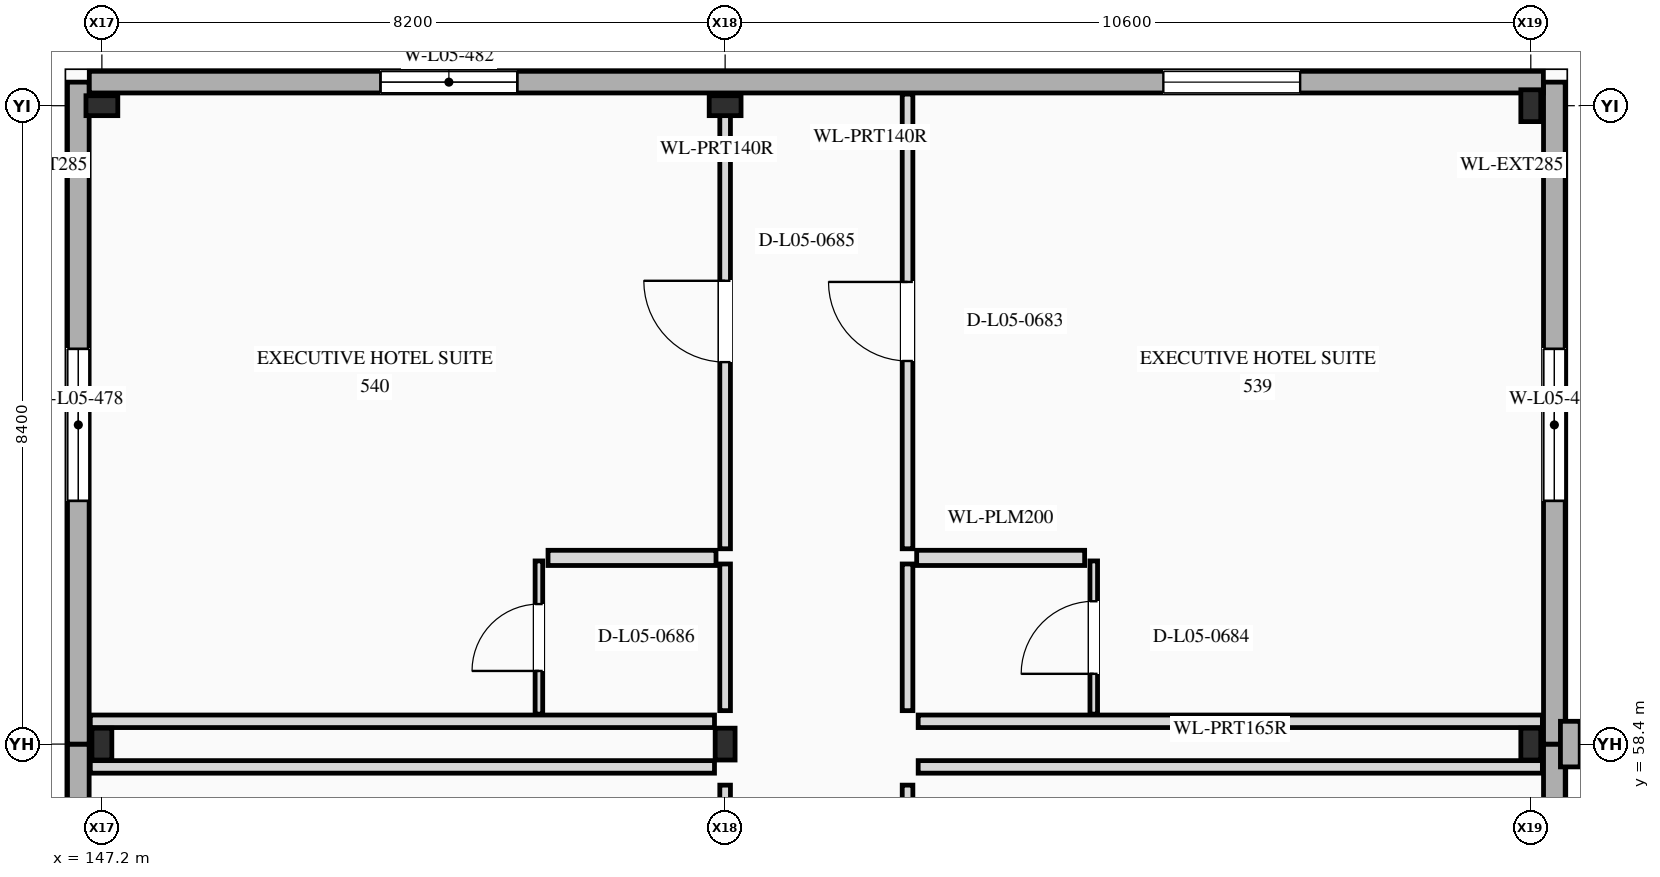
"""IFC4 building model, lengths in metres.
Left out: names, types, materials, properties, quantities, classifications, styles, units other than length and angle.
Written with IfcOpenShell. Run it as: python <this file> out.ifc"""

import sys

from ifc_helpers import new_model, si_unit, direction, frame, frame_2d, origin, origin_2d, place, context, subcontext, project, spatial, rectangle, i_section, extrude, element, fill, save


model = new_model("IFC4")
c1 = context("Model", 3, precision=1e-05, world=origin(), true_north=direction((0.0, 1.0)))
c2 = subcontext(c1, "Body", "Model", "MODEL_VIEW")
j1 = project(units=[si_unit("LENGTHUNIT", "METRE"), si_unit("PLANEANGLEUNIT", "RADIAN")], contexts=[c1])
p1 = place(None, origin())
s1 = spatial("IfcSite", under=j1, at=p1, CompositionType="ELEMENT")
p2 = place(p1, origin())
s2 = spatial("IfcBuilding", under=s1, at=p2, CompositionType="ELEMENT")
p3 = place(p2, frame((0.0, 0.0, 23.4)))
s3 = spatial("IfcBuildingStorey", under=s2, at=p3, CompositionType="ELEMENT", Elevation=23.4)
for number, where, z_axis, x_axis in (
    (1, (147.2, 58.4, 0.0), (0.0, 0.0, 1.0), (1.0, 0.0, 0.0)),
    (2, (147.2, 66.8, 0.0), (0.0, 0.0, 1.0), (0.0, 1.0, 0.0)),
    (3, (155.4, 58.4, 0.0), (0.0, 0.0, 1.0), (1.0, 0.0, 0.0)),
    (4, (155.4, 66.8, 0.0), (0.0, 0.0, 1.0), (0.0, 1.0, 0.0)),
    (5, (166.0, 58.4, 0.0), (0.0, 0.0, 1.0), (1.0, 0.0, 0.0)),
    (6, (166.0, 66.8, 0.0), (0.0, 0.0, 1.0), (1.0, 0.0, 0.0)),
):
    element("IfcColumn", number, at=place(p3, frame(where, z_axis=z_axis, x_axis=x_axis)), inside=s3, PredefinedType="COLUMN", context=c2, shape_type="SweptSolid", body=[
        extrude(i_section(OverallWidth=0.262, OverallDepth=0.419, WebThickness=0.012, FlangeThickness=0.019, at=origin_2d()), origin(), (0.0, 0.0, 1.0), 3.6),
    ])
p4 = place(p3, frame((166.31, 50.0, 0.0), z_axis=(0.0, 0.0, 1.0), x_axis=(0.0, 1.0, 0.0)))
e7 = element("IfcWall", 7, at=p4, inside=s3, PredefinedType="STANDARD", context=c2, shape_type="SweptSolid", body=[
    extrude(rectangle(XDim=8.4, YDim=0.285, at=frame_2d((4.2, 0.0))), origin(), (0.0, 0.0, 1.0), 3.6),
])
p5 = place(p4, frame((3.2, 0.0, 0.85)))
e8 = element("IfcOpeningElement", 8, at=p5, cuts=e7, PredefinedType="OPENING", context=c2, shape_type="SweptSolid", body=[
    extrude(rectangle(XDim=2.0, YDim=1.65, at=frame_2d((1.0, 0.825))), frame((0.0, 0.152, 0.0), z_axis=(0.0, -1.0, 0.0), x_axis=(1.0, 0.0, 0.0)), (0.0, 0.0, 1.0), 0.305),
])
p6 = place(p3, frame((166.31, 58.4, 0.0), z_axis=(0.0, 0.0, 1.0), x_axis=(0.0, 1.0, 0.0)))
e9 = element("IfcWall", 9, at=p6, inside=s3, PredefinedType="STANDARD", context=c2, shape_type="SweptSolid", body=[
    extrude(rectangle(XDim=8.71, YDim=0.285, at=frame_2d((4.355, 0.0))), origin(), (0.0, 0.0, 1.0), 3.6),
])
p7 = place(p6, frame((3.2, 0.0, 0.85)))
e10 = element("IfcOpeningElement", 10, at=p7, cuts=e9, PredefinedType="OPENING", context=c2, shape_type="SweptSolid", body=[
    extrude(rectangle(XDim=2.0, YDim=1.65, at=frame_2d((1.0, 0.825))), frame((0.0, 0.152, 0.0), z_axis=(0.0, -1.0, 0.0), x_axis=(1.0, 0.0, 0.0)), (0.0, 0.0, 1.0), 0.305),
])
p8 = place(p3, frame((166.52, 58.1, 0.0), z_axis=(0.0, 0.0, 1.0), x_axis=(0.0, 1.0, 0.0)))
e11 = element("IfcWall", 11, at=p8, inside=s3, PredefinedType="ELEMENTEDWALL", context=c2, shape_type="SweptSolid", body=[
    extrude(rectangle(XDim=0.6, YDim=0.26, at=frame_2d((0.3, 0.0))), origin(), (0.0, 0.0, 1.0), 3.6),
])
p9 = place(p3, frame((146.89, 50.0, 0.0), z_axis=(0.0, 0.0, 1.0), x_axis=(0.0, 1.0, 0.0)))
e12 = element("IfcWall", 12, at=p9, inside=s3, PredefinedType="STANDARD", context=c2, shape_type="SweptSolid", body=[
    extrude(rectangle(XDim=8.4, YDim=0.285, at=frame_2d((4.2, 0.0))), origin(), (0.0, 0.0, 1.0), 3.6),
])
p10 = place(p9, frame((3.2, 0.0, 0.85)))
e13 = element("IfcOpeningElement", 13, at=p10, cuts=e12, PredefinedType="OPENING", context=c2, shape_type="SweptSolid", body=[
    extrude(rectangle(XDim=2.0, YDim=1.65, at=frame_2d((1.0, 0.825))), frame((0.0, 0.152, 0.0), z_axis=(0.0, -1.0, 0.0), x_axis=(1.0, 0.0, 0.0)), (0.0, 0.0, 1.0), 0.305),
])
p11 = place(p3, frame((146.89, 58.4, 0.0), z_axis=(0.0, 0.0, 1.0), x_axis=(0.0, 1.0, 0.0)))
e14 = element("IfcWall", 14, at=p11, inside=s3, PredefinedType="STANDARD", context=c2, shape_type="SweptSolid", body=[
    extrude(rectangle(XDim=8.71, YDim=0.285, at=frame_2d((4.355, 0.0))), origin(), (0.0, 0.0, 1.0), 3.6),
])
p12 = place(p11, frame((3.2, 0.0, 0.85)))
e15 = element("IfcOpeningElement", 15, at=p12, cuts=e14, PredefinedType="OPENING", context=c2, shape_type="SweptSolid", body=[
    extrude(rectangle(XDim=2.0, YDim=1.65, at=frame_2d((1.0, 0.825))), frame((0.0, 0.152, 0.0), z_axis=(0.0, -1.0, 0.0), x_axis=(1.0, 0.0, 0.0)), (0.0, 0.0, 1.0), 0.305),
])
p13 = place(p3, frame((166.166, 67.11, 0.0), z_axis=(0.0, 0.0, 1.0), x_axis=(-1.0, 0.0, 0.0)))
e16 = element("IfcWall", 16, at=p13, inside=s3, PredefinedType="STANDARD", context=c2, shape_type="SweptSolid", body=[
    extrude(rectangle(XDim=19.131, YDim=0.285, at=frame_2d((9.565, 0.0))), origin(), (0.0, 0.0, 1.0), 3.6),
])
p14 = place(p13, frame((3.2, 0.0, 0.88)))
e17 = element("IfcOpeningElement", 17, at=p14, cuts=e16, PredefinedType="OPENING", context=c2, shape_type="SweptSolid", body=[
    extrude(rectangle(XDim=1.8, YDim=1.8, at=frame_2d((0.9, 0.9))), frame((0.0, 0.152, 0.0), z_axis=(0.0, -1.0, 0.0), x_axis=(1.0, 0.0, 0.0)), (0.0, 0.0, 1.0), 0.305),
])
p15 = place(p13, frame((13.5, 0.0, 0.88)))
e18 = element("IfcOpeningElement", 18, at=p15, cuts=e16, PredefinedType="OPENING", context=c2, shape_type="SweptSolid", body=[
    extrude(rectangle(XDim=1.8, YDim=1.8, at=frame_2d((0.9, 0.9))), frame((0.0, 0.152, 0.0), z_axis=(0.0, -1.0, 0.0), x_axis=(1.0, 0.0, 0.0)), (0.0, 0.0, 1.0), 0.305),
])
p16 = place(p3, frame((157.8, 52.57, 0.0), z_axis=(0.0, 0.0, 1.0), x_axis=(0.0, 1.0, 0.0)))
e19 = element("IfcWall", 19, at=p16, inside=s3, PredefinedType="PARTITIONING", context=c2, shape_type="SweptSolid", body=[
    extrude(rectangle(XDim=5.29, YDim=0.14, at=frame_2d((2.645, 0.0))), origin(), (0.0, 0.0, 1.0), 3.3),
])
p17 = place(p16, frame((2.155, 0.0, 0.0)))
e20 = element("IfcOpeningElement", 20, at=p17, cuts=e19, PredefinedType="OPENING", context=c2, shape_type="SweptSolid", body=[
    extrude(rectangle(XDim=0.98, YDim=2.35, at=frame_2d((0.49, 1.175))), frame((0.0, 0.08, 0.0), z_axis=(0.0, -1.0, 0.0), x_axis=(1.0, 0.0, 0.0)), (0.0, 0.0, 1.0), 0.16),
])
p18 = place(p3, frame((157.94, 58.1, 0.0), z_axis=(0.0, 0.0, 1.0), x_axis=(1.0, 0.0, 0.0)))
e21 = element("IfcWall", 21, at=p18, inside=s3, PredefinedType="PARTITIONING", context=c2, shape_type="SweptSolid", body=[
    extrude(rectangle(XDim=8.213, YDim=0.165, at=frame_2d((4.106, 0.0))), origin(), (0.0, 0.0, 1.0), 2.69),
])
p19 = place(p3, frame((155.4, 52.57, 0.0), z_axis=(0.0, 0.0, 1.0), x_axis=(0.0, 1.0, 0.0)))
e22 = element("IfcWall", 22, at=p19, inside=s3, PredefinedType="PARTITIONING", context=c2, shape_type="SweptSolid", body=[
    extrude(rectangle(XDim=5.29, YDim=0.14, at=frame_2d((2.645, 0.0))), origin(), (0.0, 0.0, 1.0), 2.69),
])
p20 = place(p19, frame((2.14, 0.0, 0.0)))
e23 = element("IfcOpeningElement", 23, at=p20, cuts=e22, PredefinedType="OPENING", context=c2, shape_type="SweptSolid", body=[
    extrude(rectangle(XDim=1.01, YDim=2.35, at=frame_2d((0.505, 1.175))), frame((0.0, 0.08, 0.0), z_axis=(0.0, -1.0, 0.0), x_axis=(1.0, 0.0, 0.0)), (0.0, 0.0, 1.0), 0.16),
])
p21 = place(p3, frame((147.048, 58.1, 0.0), z_axis=(0.0, 0.0, 1.0), x_axis=(1.0, 0.0, 0.0)))
e24 = element("IfcWall", 24, at=p21, inside=s3, PredefinedType="PARTITIONING", context=c2, shape_type="SweptSolid", body=[
    extrude(rectangle(XDim=8.212, YDim=0.165, at=frame_2d((4.106, 0.0))), origin(), (0.0, 0.0, 1.0), 2.713),
])
p22 = place(p3, frame((157.8, 58.84, 0.0), z_axis=(0.0, 0.0, 1.0), x_axis=(0.0, 1.0, 0.0)))
e25 = element("IfcWall", 25, at=p22, inside=s3, PredefinedType="PARTITIONING", context=c2, shape_type="SweptSolid", body=[
    extrude(rectangle(XDim=1.93, YDim=0.14, at=frame_2d((0.965, 0.0))), origin(), (0.0, 0.0, 1.0), 2.858),
])
p23 = place(p3, frame((157.8, 60.97, 0.0), z_axis=(0.0, 0.0, 1.0), x_axis=(0.0, 1.0, 0.0)))
e26 = element("IfcWall", 26, at=p23, inside=s3, PredefinedType="PARTITIONING", context=c2, shape_type="SweptSolid", body=[
    extrude(rectangle(XDim=5.982, YDim=0.14, at=frame_2d((2.991, 0.0))), origin(), (0.0, 0.0, 1.0), 2.713),
])
p24 = place(p23, frame((2.471, 0.0, 0.0)))
e27 = element("IfcOpeningElement", 27, at=p24, cuts=e26, PredefinedType="OPENING", context=c2, shape_type="SweptSolid", body=[
    extrude(rectangle(XDim=1.04, YDim=2.4, at=frame_2d((0.52, 1.2))), frame((0.0, 0.08, 0.0), z_axis=(0.0, -1.0, 0.0), x_axis=(1.0, 0.0, 0.0)), (0.0, 0.0, 1.0), 0.16),
])
p25 = place(p3, frame((157.94, 58.7, 0.0), z_axis=(0.0, 0.0, 1.0), x_axis=(1.0, 0.0, 0.0)))
e28 = element("IfcWall", 28, at=p25, inside=s3, PredefinedType="PARTITIONING", context=c2, shape_type="SweptSolid", body=[
    extrude(rectangle(XDim=8.213, YDim=0.165, at=frame_2d((4.106, 0.0))), origin(), (0.0, 0.0, 1.0), 2.69),
])
p26 = place(p3, frame((157.92, 60.85, 0.0), z_axis=(0.0, 0.0, 1.0), x_axis=(1.0, 0.0, 0.0)))
e29 = element("IfcWall", 29, at=p26, inside=s3, PredefinedType="PLUMBINGWALL", context=c2, shape_type="SweptSolid", body=[
    extrude(rectangle(XDim=2.21, YDim=0.2, at=frame_2d((1.105, 0.0))), origin(), (0.0, 0.0, 1.0), 3.3),
])
p27 = place(p3, frame((160.25, 58.794, 0.0), z_axis=(0.0, 0.0, 1.0), x_axis=(0.0, 1.0, 0.0)))
e30 = element("IfcWall", 30, at=p27, inside=s3, PredefinedType="PARTITIONING", context=c2, shape_type="SweptSolid", body=[
    extrude(rectangle(XDim=2.016, YDim=0.1, at=frame_2d((1.008, 0.0))), origin(), (0.0, 0.0, 1.0), 2.858),
])
p28 = place(p27, frame((0.53, 0.0, 0.0)))
e31 = element("IfcOpeningElement", 31, at=p28, cuts=e30, PredefinedType="OPENING", context=c2, shape_type="SweptSolid", body=[
    extrude(rectangle(XDim=0.955, YDim=2.14, at=frame_2d((0.478, 1.07))), frame((0.0, 0.06, 0.0), z_axis=(0.0, -1.0, 0.0), x_axis=(1.0, 0.0, 0.0)), (0.0, 0.0, 1.0), 0.12),
])
p29 = place(p3, frame((155.4, 58.84, 0.0), z_axis=(0.0, 0.0, 1.0), x_axis=(0.0, 1.0, 0.0)))
e32 = element("IfcWall", 32, at=p29, inside=s3, PredefinedType="PARTITIONING", context=c2, shape_type="SweptSolid", body=[
    extrude(rectangle(XDim=1.93, YDim=0.14, at=frame_2d((0.965, 0.0))), origin(), (0.0, 0.0, 1.0), 2.774),
])
p30 = place(p3, frame((155.4, 60.97, 0.0), z_axis=(0.0, 0.0, 1.0), x_axis=(0.0, 1.0, 0.0)))
e33 = element("IfcWall", 33, at=p30, inside=s3, PredefinedType="PARTITIONING", context=c2, shape_type="SweptSolid", body=[
    extrude(rectangle(XDim=5.982, YDim=0.14, at=frame_2d((2.991, 0.0))), origin(), (0.0, 0.0, 1.0), 2.713),
])
p31 = place(p30, frame((2.456, 0.0, 0.0)))
e34 = element("IfcOpeningElement", 34, at=p31, cuts=e33, PredefinedType="OPENING", context=c2, shape_type="SweptSolid", body=[
    extrude(rectangle(XDim=1.07, YDim=2.4, at=frame_2d((0.535, 1.2))), frame((0.0, 0.08, 0.0), z_axis=(0.0, -1.0, 0.0), x_axis=(1.0, 0.0, 0.0)), (0.0, 0.0, 1.0), 0.16),
])
p32 = place(p3, frame((147.048, 58.7, 0.0), z_axis=(0.0, 0.0, 1.0), x_axis=(1.0, 0.0, 0.0)))
e35 = element("IfcWall", 35, at=p32, inside=s3, PredefinedType="PARTITIONING", context=c2, shape_type="SweptSolid", body=[
    extrude(rectangle(XDim=8.212, YDim=0.165, at=frame_2d((4.106, 0.0))), origin(), (0.0, 0.0, 1.0), 2.713),
])
p33 = place(p3, frame((153.07, 60.85, 0.0), z_axis=(0.0, 0.0, 1.0), x_axis=(1.0, 0.0, 0.0)))
e36 = element("IfcWall", 36, at=p33, inside=s3, PredefinedType="PLUMBINGWALL", context=c2, shape_type="SweptSolid", body=[
    extrude(rectangle(XDim=2.21, YDim=0.2, at=frame_2d((1.105, 0.0))), origin(), (0.0, 0.0, 1.0), 3.3),
])
p34 = place(p3, frame((152.95, 58.794, 0.0), z_axis=(0.0, 0.0, 1.0), x_axis=(0.0, 1.0, 0.0)))
e37 = element("IfcWall", 37, at=p34, inside=s3, PredefinedType="PARTITIONING", context=c2, shape_type="SweptSolid", body=[
    extrude(rectangle(XDim=2.016, YDim=0.1, at=frame_2d((1.008, 0.0))), origin(), (0.0, 0.0, 1.0), 2.908),
])
p35 = place(p34, frame((0.568, 0.0, 0.0)))
e38 = element("IfcOpeningElement", 38, at=p35, cuts=e37, PredefinedType="OPENING", context=c2, shape_type="SweptSolid", body=[
    extrude(rectangle(XDim=0.88, YDim=2.18, at=frame_2d((0.44, 1.09))), frame((0.0, 0.06, 0.0), z_axis=(0.0, -1.0, 0.0), x_axis=(1.0, 0.0, 0.0)), (0.0, 0.0, 1.0), 0.12),
])
p36 = place(p7, origin())
e39 = element("IfcWindow", 39, at=p36, inside=s3, PartitioningType="SINGLE_PANEL", PredefinedType="WINDOW", context=c2, shape_type="SweptSolid", body=[
    extrude(rectangle(XDim=2.0, YDim=1.65, at=frame_2d((1.0, 0.825))), frame((0.0, 0.03, 0.0), z_axis=(0.0, -1.0, 0.0), x_axis=(1.0, 0.0, 0.0)), (0.0, 0.0, 1.0), 0.06),
])
fill(e10, e39)
p37 = place(p12, origin())
e40 = element("IfcWindow", 40, at=p37, inside=s3, PartitioningType="SINGLE_PANEL", PredefinedType="WINDOW", context=c2, shape_type="SweptSolid", body=[
    extrude(rectangle(XDim=2.0, YDim=1.65, at=frame_2d((1.0, 0.825))), frame((0.0, 0.03, 0.0), z_axis=(0.0, -1.0, 0.0), x_axis=(1.0, 0.0, 0.0)), (0.0, 0.0, 1.0), 0.06),
])
fill(e15, e40)
p38 = place(p14, origin())
e41 = element("IfcWindow", 41, at=p38, inside=s3, PartitioningType="SINGLE_PANEL", PredefinedType="WINDOW", context=c2, shape_type="SweptSolid", body=[
    extrude(rectangle(XDim=1.8, YDim=1.8, at=frame_2d((0.9, 0.9))), frame((0.0, 0.03, 0.0), z_axis=(0.0, -1.0, 0.0), x_axis=(1.0, 0.0, 0.0)), (0.0, 0.0, 1.0), 0.06),
])
fill(e17, e41)
p39 = place(p15, origin())
e42 = element("IfcWindow", 42, at=p39, inside=s3, PartitioningType="SINGLE_PANEL", PredefinedType="WINDOW", context=c2, shape_type="SweptSolid", body=[
    extrude(rectangle(XDim=1.8, YDim=1.8, at=frame_2d((0.9, 0.9))), frame((0.0, 0.03, 0.0), z_axis=(0.0, -1.0, 0.0), x_axis=(1.0, 0.0, 0.0)), (0.0, 0.0, 1.0), 0.06),
])
fill(e18, e42)
p40 = place(p24, origin())
e43 = element("IfcDoor", 43, at=p40, inside=s3, OperationType="SINGLE_SWING_RIGHT", PredefinedType="DOOR", context=c2, shape_type="SweptSolid", body=[
    extrude(rectangle(XDim=1.04, YDim=2.4, at=frame_2d((0.52, 1.2))), frame((0.0, 0.025, 0.0), z_axis=(0.0, -1.0, 0.0), x_axis=(1.0, 0.0, 0.0)), (0.0, 0.0, 1.0), 0.05),
])
fill(e27, e43)
p41 = place(p28, origin())
e44 = element("IfcDoor", 44, at=p41, inside=s3, OperationType="SINGLE_SWING_LEFT", PredefinedType="DOOR", context=c2, shape_type="SweptSolid", body=[
    extrude(rectangle(XDim=0.955, YDim=2.14, at=frame_2d((0.478, 1.07))), frame((0.0, 0.025, 0.0), z_axis=(0.0, -1.0, 0.0), x_axis=(1.0, 0.0, 0.0)), (0.0, 0.0, 1.0), 0.05),
])
fill(e31, e44)
p42 = place(p31, origin())
e45 = element("IfcDoor", 45, at=p42, inside=s3, OperationType="SINGLE_SWING_RIGHT", PredefinedType="DOOR", context=c2, shape_type="SweptSolid", body=[
    extrude(rectangle(XDim=1.07, YDim=2.4, at=frame_2d((0.535, 1.2))), frame((0.0, 0.025, 0.0), z_axis=(0.0, -1.0, 0.0), x_axis=(1.0, 0.0, 0.0)), (0.0, 0.0, 1.0), 0.05),
])
fill(e34, e45)
p43 = place(p35, origin())
e46 = element("IfcDoor", 46, at=p43, inside=s3, OperationType="SINGLE_SWING_LEFT", PredefinedType="DOOR", context=c2, shape_type="SweptSolid", body=[
    extrude(rectangle(XDim=0.88, YDim=2.18, at=frame_2d((0.44, 1.09))), frame((0.0, 0.025, 0.0), z_axis=(0.0, -1.0, 0.0), x_axis=(1.0, 0.0, 0.0)), (0.0, 0.0, 1.0), 0.05),
])
fill(e38, e46)
save(model, sys.argv[1])
